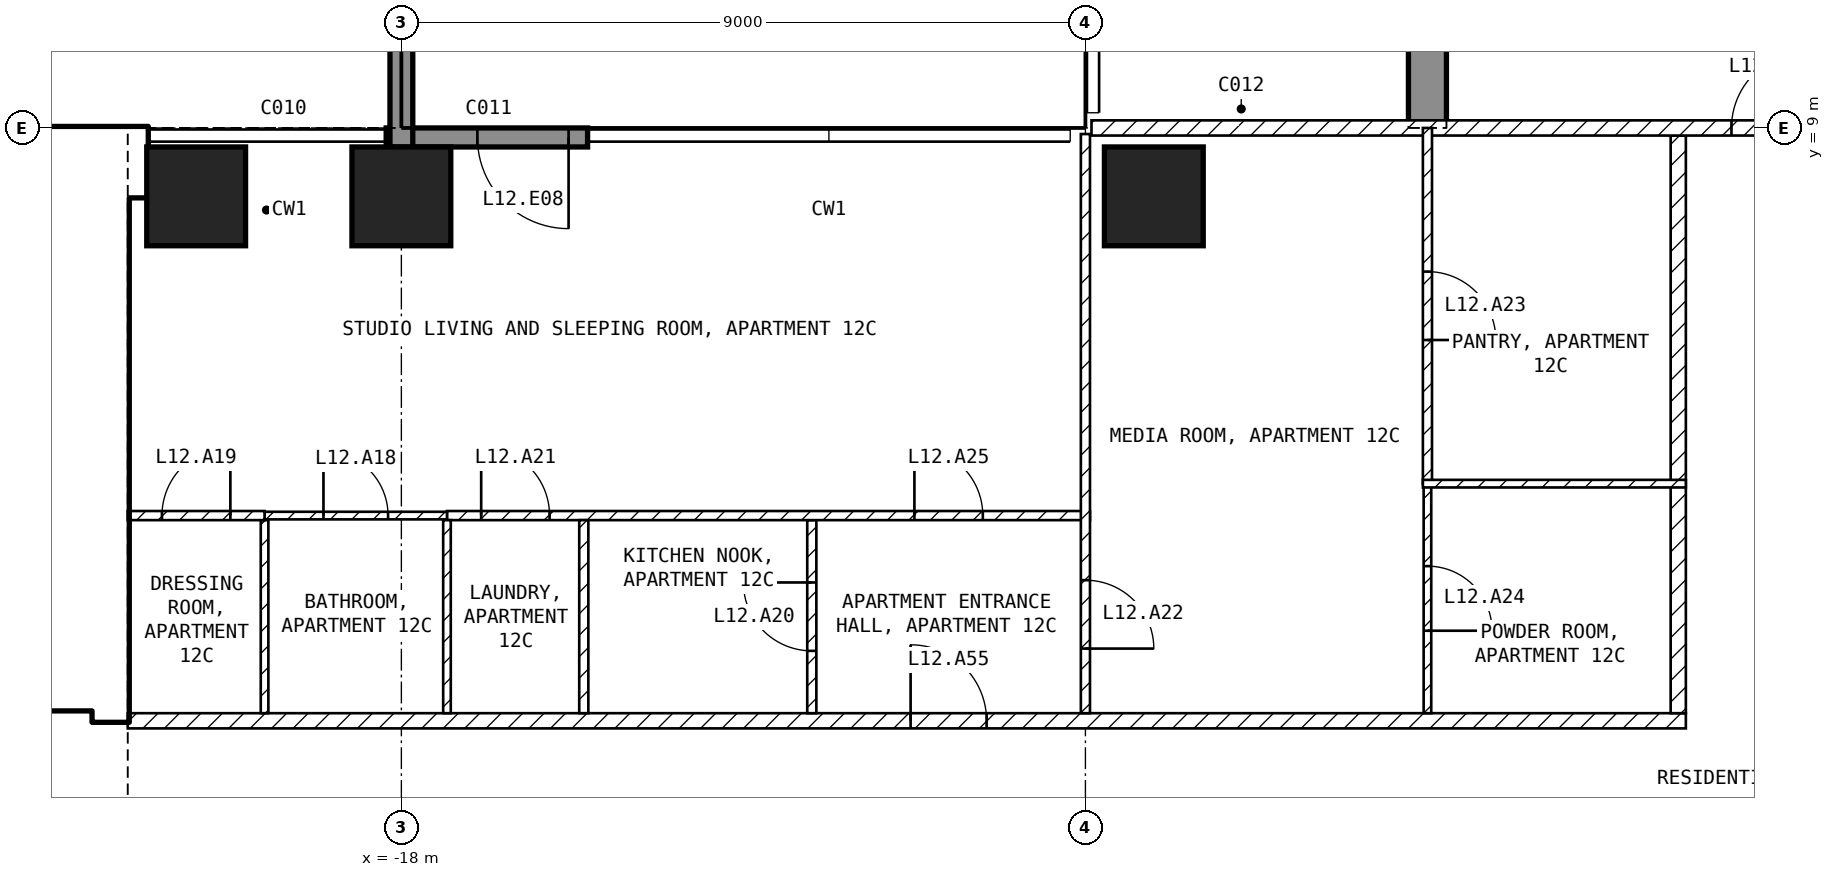
"""IFC4 building model, lengths in metres.
Left out: names, types, materials, properties, quantities, classifications, styles, units other than length and angle.
Written with IfcOpenShell. Run it as: python <this file> out.ifc"""

import sys

from ifc_helpers import new_model, si_unit, direction, frame, frame_2d, origin, origin_2d, place, context, subcontext, project, spatial, polyline, rectangle, outline, extrude, element, fill, save


model = new_model("IFC4")
c1 = context("Model", 3, precision=1e-05, world=origin(), true_north=direction((0.0, 1.0)))
c2 = subcontext(c1, "Body", "Model", "MODEL_VIEW")
j1 = project(units=[si_unit("LENGTHUNIT", "METRE"), si_unit("PLANEANGLEUNIT", "RADIAN")], contexts=[c1])
p1 = place(None, origin())
s1 = spatial("IfcSite", under=j1, at=p1, CompositionType="ELEMENT")
p2 = place(p1, origin())
s2 = spatial("IfcBuilding", under=s1, at=p2, CompositionType="ELEMENT")
p3 = place(p2, frame((0.0, 0.0, 61.0)))
s3 = spatial("IfcBuildingStorey", under=s2, at=p3, CompositionType="ELEMENT", Elevation=61.0)
for number, where, z_axis, x_axis in (
    (1, (-20.7, 8.1, -0.25), (0.0, 0.0, 1.0), (1.0, 0.0, 0.0)),
    (2, (-18.0, 8.1, -0.25), (0.0, 0.0, 1.0), (1.0, 0.0, 0.0)),
    (3, (-8.1, 8.1, -0.25), (0.0, 0.0, 1.0), (1.0, 0.0, 0.0)),
):
    element("IfcColumn", number, at=place(p3, frame(where, z_axis=z_axis, x_axis=x_axis)), inside=s3, PredefinedType="COLUMN", context=c2, shape_type="SweptSolid", body=[
        extrude(rectangle(XDim=1.3, YDim=1.3, at=origin_2d()), origin(), (0.0, 0.0, 1.0), 3.5),
    ])
p4 = place(p3, frame((-4.75, 9.0, -0.25), z_axis=(1.0, 0.0, 0.0), x_axis=(0.0, 1.0, 0.0)))
e4 = element("IfcWall", 4, at=p4, inside=s3, PredefinedType="SHEAR", context=c2, shape_type="SweptSolid", body=[
    extrude(outline(polyline([(0.0, 0.0), (2.1, 0.0), (2.1, 2.65), (4.5, 2.65), (4.5, 0.0), (9.9, 0.0), (9.9, 2.65), (12.3, 2.65), (12.3, 0.0), (16.45, 0.0), (16.45, 3.5), (0.0, 3.5), (0.0, 0.0)])), origin(), (0.0, 0.0, 1.0), 0.5),
])
p5 = place(p3, frame((-15.55, 8.875, 0.0), z_axis=(0.0, 0.0, 1.0), x_axis=(-1.0, 0.0, 0.0)))
e5 = element("IfcWall", 5, at=p5, inside=s3, PredefinedType="SOLIDWALL", context=c2, shape_type="SweptSolid", body=[
    extrude(rectangle(XDim=2.65, YDim=0.25, at=frame_2d((1.325, 0.0))), origin(), (0.0, 0.0, 1.0), 3.25),
])
p6 = place(p5, frame((0.25, 0.0, 0.0)))
e6 = element("IfcOpeningElement", 6, at=p6, cuts=e5, PredefinedType="OPENING", context=c2, shape_type="SweptSolid", body=[
    extrude(rectangle(XDim=1.2, YDim=2.4, at=frame_2d((0.6, 1.2))), frame((0.0, 0.135, 0.0), z_axis=(0.0, -1.0, 0.0), x_axis=(1.0, 0.0, 0.0)), (0.0, 0.0, 1.0), 0.27),
])
p7 = place(p3, frame((-18.0, 8.75, 0.0), z_axis=(0.0, 0.0, 1.0), x_axis=(0.0, 1.0, 0.0)))
e7 = element("IfcWall", 7, at=p7, inside=s3, PredefinedType="SOLIDWALL", context=c2, shape_type="SweptSolid", body=[
    extrude(rectangle(XDim=2.95, YDim=0.3, at=frame_2d((1.475, 0.0))), origin(), (0.0, 0.0, 1.0), 3.25),
])
p8 = place(p3, frame((-31.5, 8.55, 0.0), z_axis=(0.0, 0.0, 1.0), x_axis=(1.0, 0.0, 0.0)))
e8 = element("IfcWall", 8, at=p8, inside=s3, PredefinedType="SHEAR", context=c2, shape_type="SweptSolid", body=[
    extrude(rectangle(XDim=10.15, YDim=0.9, at=frame_2d((5.075, 0.0))), origin(), (0.0, 0.0, 1.0), 3.25),
])
p9 = place(p3, frame((-21.825, 1.2, 0.0), z_axis=(0.0, 0.0, 1.0), x_axis=(0.0, 1.0, 0.0)))
e9 = element("IfcWall", 9, at=p9, inside=s3, PredefinedType="SHEAR", context=c2, shape_type="SweptSolid", body=[
    extrude(rectangle(XDim=6.9, YDim=0.45, at=frame_2d((3.45, 0.0))), origin(), (0.0, 0.0, 1.0), 3.25),
])
p10 = place(p3, frame((-35.1, 1.45, 0.0), z_axis=(0.0, 0.0, 1.0), x_axis=(1.0, 0.0, 0.0)))
e10 = element("IfcWall", 10, at=p10, inside=s3, PredefinedType="SOLIDWALL", context=c2, shape_type="SweptSolid", body=[
    extrude(rectangle(XDim=13.05, YDim=0.2, at=frame_2d((6.525, 0.0))), origin(), (0.0, 0.0, 1.0), 3.25),
])
p11 = place(p10, frame((11.3, 0.0, 0.0)))
e11 = element("IfcOpeningElement", 11, at=p11, cuts=e10, PredefinedType="OPENING", context=c2, shape_type="SweptSolid", body=[
    extrude(rectangle(XDim=1.0, YDim=2.1, at=frame_2d((0.5, 1.05))), frame((0.0, 0.11, 0.0), z_axis=(0.0, -1.0, 0.0), x_axis=(1.0, 0.0, 0.0)), (0.0, 0.0, 1.0), 0.22),
])
p12 = place(p10, frame((8.8, 0.0, 0.0)))
e12 = element("IfcOpeningElement", 12, at=p12, cuts=e10, PredefinedType="OPENING", context=c2, shape_type="SweptSolid", body=[
    extrude(rectangle(XDim=1.0, YDim=2.1, at=frame_2d((0.5, 1.05))), frame((0.0, 0.11, 0.0), z_axis=(0.0, -1.0, 0.0), x_axis=(1.0, 0.0, 0.0)), (0.0, 0.0, 1.0), 0.22),
])
p13 = place(p3, frame((-28.35, 5.15, 0.0), z_axis=(0.0, 0.0, 1.0), x_axis=(1.0, 0.0, 0.0)))
e13 = element("IfcWall", 13, at=p13, inside=s3, PredefinedType="SOLIDWALL", context=c2, shape_type="SweptSolid", body=[
    extrude(rectangle(XDim=6.3, YDim=0.2, at=frame_2d((3.15, 0.0))), origin(), (0.0, 0.0, 1.0), 3.25),
])
p14 = place(p13, frame((5.1, 0.0, 0.0)))
e14 = element("IfcOpeningElement", 14, at=p14, cuts=e13, PredefinedType="OPENING", context=c2, shape_type="SweptSolid", body=[
    extrude(rectangle(XDim=1.0, YDim=2.1, at=frame_2d((0.5, 1.05))), frame((0.0, 0.11, 0.0), z_axis=(0.0, -1.0, 0.0), x_axis=(1.0, 0.0, 0.0)), (0.0, 0.0, 1.0), 0.22),
])
p15 = place(p3, frame((-21.6, 1.2, 0.0), z_axis=(0.0, 0.0, 1.0), x_axis=(1.0, 0.0, 0.0)))
e15 = element("IfcWall", 15, at=p15, inside=s3, PredefinedType="PARTITIONING", context=c2, shape_type="SweptSolid", body=[
    extrude(rectangle(XDim=20.5, YDim=0.2, at=frame_2d((10.25, 0.0))), origin(), (0.0, 0.0, 1.0), 3.25),
])
p16 = place(p15, frame((10.3, 0.0, 0.0)))
e16 = element("IfcOpeningElement", 16, at=p16, cuts=e15, PredefinedType="OPENING", context=c2, shape_type="SweptSolid", body=[
    extrude(rectangle(XDim=1.0, YDim=2.1, at=frame_2d((0.5, 1.05))), frame((0.0, 0.11, 0.0), z_axis=(0.0, -1.0, 0.0), x_axis=(1.0, 0.0, 0.0)), (0.0, 0.0, 1.0), 0.22),
])
p17 = place(p3, frame((-1.2, 1.3, 0.0), z_axis=(0.0, 0.0, 1.0), x_axis=(0.0, 1.0, 0.0)))
e17 = element("IfcWall", 17, at=p17, inside=s3, PredefinedType="PARTITIONING", context=c2, shape_type="SweptSolid", body=[
    extrude(rectangle(XDim=7.6, YDim=0.2, at=frame_2d((3.8, 0.0))), origin(), (0.0, 0.0, 1.0), 3.25),
])
p18 = place(p3, frame((-8.92, 9.0, 0.0), z_axis=(0.0, 0.0, 1.0), x_axis=(1.0, 0.0, 0.0)))
e18 = element("IfcWall", 18, at=p18, inside=s3, PredefinedType="PARTITIONING", context=c2, shape_type="SweptSolid", body=[
    extrude(rectangle(XDim=17.84, YDim=0.2, at=frame_2d((8.92, 0.0))), origin(), (0.0, 0.0, 1.0), 3.25),
])
p19 = place(p18, frame((8.42, 0.0, 0.0)))
e19 = element("IfcOpeningElement", 19, at=p19, cuts=e18, PredefinedType="OPENING", context=c2, shape_type="SweptSolid", body=[
    extrude(rectangle(XDim=1.0, YDim=2.1, at=frame_2d((0.5, 1.05))), frame((0.0, 0.11, 0.0), z_axis=(0.0, -1.0, 0.0), x_axis=(1.0, 0.0, 0.0)), (0.0, 0.0, 1.0), 0.22),
])
p20 = place(p3, frame((-12.6, 1.3, 0.0), z_axis=(0.0, 0.0, 1.0), x_axis=(0.0, 1.0, 0.0)))
e20 = element("IfcWall", 20, at=p20, inside=s3, PredefinedType="PARTITIONING", context=c2, shape_type="SweptSolid", body=[
    extrude(rectangle(XDim=2.54, YDim=0.12, at=frame_2d((1.27, 0.0))), origin(), (0.0, 0.0, 1.0), 3.25),
])
p21 = place(p20, frame((0.82, 0.0, 0.0)))
e21 = element("IfcOpeningElement", 21, at=p21, cuts=e20, PredefinedType="OPENING", context=c2, shape_type="SweptSolid", body=[
    extrude(rectangle(XDim=0.9, YDim=2.1, at=frame_2d((0.45, 1.05))), frame((0.0, 0.07, 0.0), z_axis=(0.0, -1.0, 0.0), x_axis=(1.0, 0.0, 0.0)), (0.0, 0.0, 1.0), 0.14),
])
p22 = place(p3, frame((-17.4, 3.9, 0.0), z_axis=(0.0, 0.0, 1.0), x_axis=(1.0, 0.0, 0.0)))
e22 = element("IfcWall", 22, at=p22, inside=s3, PredefinedType="PARTITIONING", context=c2, shape_type="SweptSolid", body=[
    extrude(rectangle(XDim=8.46, YDim=0.12, at=frame_2d((4.23, 0.0))), origin(), (0.0, 0.0, 1.0), 3.25),
])
p23 = place(p22, frame((0.45, 0.0, 0.0)))
e23 = element("IfcOpeningElement", 23, at=p23, cuts=e22, PredefinedType="OPENING", context=c2, shape_type="SweptSolid", body=[
    extrude(rectangle(XDim=0.9, YDim=2.1, at=frame_2d((0.45, 1.05))), frame((0.0, 0.07, 0.0), z_axis=(0.0, -1.0, 0.0), x_axis=(1.0, 0.0, 0.0)), (0.0, 0.0, 1.0), 0.14),
])
p24 = place(p22, frame((6.15, 0.0, 0.0)))
e24 = element("IfcOpeningElement", 24, at=p24, cuts=e22, PredefinedType="OPENING", context=c2, shape_type="SweptSolid", body=[
    extrude(rectangle(XDim=0.9, YDim=2.1, at=frame_2d((0.45, 1.05))), frame((0.0, 0.07, 0.0), z_axis=(0.0, -1.0, 0.0), x_axis=(1.0, 0.0, 0.0)), (0.0, 0.0, 1.0), 0.14),
])
p25 = place(p3, frame((-9.0, 8.92, 0.0), z_axis=(0.0, 0.0, 1.0), x_axis=(0.0, -1.0, 0.0)))
e25 = element("IfcWall", 25, at=p25, inside=s3, PredefinedType="PARTITIONING", context=c2, shape_type="SweptSolid", body=[
    extrude(rectangle(XDim=7.62, YDim=0.12, at=frame_2d((3.81, 0.0))), origin(), (0.0, 0.0, 1.0), 3.25),
])
p26 = place(p25, frame((5.87, 0.0, 0.0)))
e26 = element("IfcOpeningElement", 26, at=p26, cuts=e25, PredefinedType="OPENING", context=c2, shape_type="SweptSolid", body=[
    extrude(rectangle(XDim=0.9, YDim=2.1, at=frame_2d((0.45, 1.05))), frame((0.0, 0.07, 0.0), z_axis=(0.0, -1.0, 0.0), x_axis=(1.0, 0.0, 0.0)), (0.0, 0.0, 1.0), 0.14),
])
p27 = place(p3, frame((-15.6, 1.3, 0.0), z_axis=(0.0, 0.0, 1.0), x_axis=(0.0, 1.0, 0.0)))
e27 = element("IfcWall", 27, at=p27, inside=s3, PredefinedType="PARTITIONING", context=c2, shape_type="SweptSolid", body=[
    extrude(rectangle(XDim=2.54, YDim=0.12, at=frame_2d((1.27, 0.0))), origin(), (0.0, 0.0, 1.0), 3.25),
])
for number, where, z_axis, x_axis in (
    (28, (-17.4, 1.3, 0.0), (0.0, 0.0, 1.0), (0.0, 1.0, 0.0)),
    (29, (-19.8, 1.3, 0.0), (0.0, 0.0, 1.0), (0.0, 1.0, 0.0)),
):
    element("IfcWall", number, at=place(p3, frame(where, z_axis=z_axis, x_axis=x_axis)), inside=s3, PredefinedType="PARTITIONING", context=c2, shape_type="SweptSolid", body=[
        extrude(rectangle(XDim=2.54, YDim=0.1, at=frame_2d((1.27, 0.0))), origin(), (0.0, 0.0, 1.0), 3.25),
    ])
p28 = place(p3, frame((-19.8, 3.9, 0.0), z_axis=(0.0, 0.0, 1.0), x_axis=(1.0, 0.0, 0.0)))
e30 = element("IfcWall", 30, at=p28, inside=s3, PredefinedType="PARTITIONING", context=c2, shape_type="SweptSolid", body=[
    extrude(rectangle(XDim=2.4, YDim=0.1, at=frame_2d((1.2, 0.0))), origin(), (0.0, 0.0, 1.0), 3.25),
])
p29 = place(p28, frame((0.775, 0.0, 0.0)))
e31 = element("IfcOpeningElement", 31, at=p29, cuts=e30, PredefinedType="OPENING", context=c2, shape_type="SweptSolid", body=[
    extrude(rectangle(XDim=0.85, YDim=2.1, at=frame_2d((0.425, 1.05))), frame((0.0, 0.06, 0.0), z_axis=(0.0, -1.0, 0.0), x_axis=(1.0, 0.0, 0.0)), (0.0, 0.0, 1.0), 0.12),
])
p30 = place(p3, frame((-21.6, 3.9, 0.0), z_axis=(0.0, 0.0, 1.0), x_axis=(1.0, 0.0, 0.0)))
e32 = element("IfcWall", 32, at=p30, inside=s3, PredefinedType="PARTITIONING", context=c2, shape_type="SweptSolid", body=[
    extrude(rectangle(XDim=1.8, YDim=0.12, at=frame_2d((0.9, 0.0))), origin(), (0.0, 0.0, 1.0), 3.25),
])
p31 = place(p30, frame((0.45, 0.0, 0.0)))
e33 = element("IfcOpeningElement", 33, at=p31, cuts=e32, PredefinedType="OPENING", context=c2, shape_type="SweptSolid", body=[
    extrude(rectangle(XDim=0.9, YDim=2.1, at=frame_2d((0.45, 1.05))), frame((0.0, 0.07, 0.0), z_axis=(0.0, -1.0, 0.0), x_axis=(1.0, 0.0, 0.0)), (0.0, 0.0, 1.0), 0.14),
])
p32 = place(p3, frame((-4.5, 4.32, 0.0), z_axis=(0.0, 0.0, 1.0), x_axis=(0.0, -1.0, 0.0)))
e34 = element("IfcWall", 34, at=p32, inside=s3, PredefinedType="PARTITIONING", context=c2, shape_type="SweptSolid", body=[
    extrude(rectangle(XDim=3.02, YDim=0.1, at=frame_2d((1.51, 0.0))), origin(), (0.0, 0.0, 1.0), 3.25),
])
p33 = place(p32, frame((1.085, 0.0, 0.0)))
e35 = element("IfcOpeningElement", 35, at=p33, cuts=e34, PredefinedType="OPENING", context=c2, shape_type="SweptSolid", body=[
    extrude(rectangle(XDim=0.85, YDim=2.1, at=frame_2d((0.425, 1.05))), frame((0.0, 0.06, 0.0), z_axis=(0.0, -1.0, 0.0), x_axis=(1.0, 0.0, 0.0)), (0.0, 0.0, 1.0), 0.12),
])
p34 = place(p3, frame((-4.5, 9.0, 0.0), z_axis=(0.0, 0.0, 1.0), x_axis=(0.0, -1.0, 0.0)))
e36 = element("IfcWall", 36, at=p34, inside=s3, PredefinedType="PARTITIONING", context=c2, shape_type="SweptSolid", body=[
    extrude(rectangle(XDim=4.68, YDim=0.12, at=frame_2d((2.34, 0.0))), origin(), (0.0, 0.0, 1.0), 3.25),
])
p35 = place(p34, frame((1.89, 0.0, 0.0)))
e37 = element("IfcOpeningElement", 37, at=p35, cuts=e36, PredefinedType="OPENING", context=c2, shape_type="SweptSolid", body=[
    extrude(rectangle(XDim=0.9, YDim=2.1, at=frame_2d((0.45, 1.05))), frame((0.0, 0.07, 0.0), z_axis=(0.0, -1.0, 0.0), x_axis=(1.0, 0.0, 0.0)), (0.0, 0.0, 1.0), 0.14),
])
p36 = place(p3, frame((-4.56, 4.32, 0.0), z_axis=(0.0, 0.0, 1.0), x_axis=(1.0, 0.0, 0.0)))
e38 = element("IfcWall", 38, at=p36, inside=s3, PredefinedType="PARTITIONING", context=c2, shape_type="SweptSolid", body=[
    extrude(rectangle(XDim=3.46, YDim=0.1, at=frame_2d((1.73, 0.0))), origin(), (0.0, 0.0, 1.0), 3.25),
])
p37 = place(p6, origin())
e39 = element("IfcDoor", 39, at=p37, inside=s3, OperationType="SINGLE_SWING_LEFT", PredefinedType="DOOR", context=c2, shape_type="SweptSolid", body=[
    extrude(rectangle(XDim=1.2, YDim=2.4, at=frame_2d((0.6, 1.2))), frame((0.0, 0.025, 0.0), z_axis=(0.0, -1.0, 0.0), x_axis=(1.0, 0.0, 0.0)), (0.0, 0.0, 1.0), 0.05),
])
fill(e6, e39)
p38 = place(p14, origin())
e40 = element("IfcDoor", 40, at=p38, inside=s3, OperationType="SINGLE_SWING_LEFT", PredefinedType="DOOR", context=c2, shape_type="SweptSolid", body=[
    extrude(rectangle(XDim=1.0, YDim=2.1, at=frame_2d((0.5, 1.05))), frame((0.0, 0.025, 0.0), z_axis=(0.0, -1.0, 0.0), x_axis=(1.0, 0.0, 0.0)), (0.0, 0.0, 1.0), 0.05),
])
fill(e14, e40)
p39 = place(p29, origin())
e41 = element("IfcDoor", 41, at=p39, inside=s3, OperationType="SINGLE_SWING_LEFT", PredefinedType="DOOR", context=c2, shape_type="SweptSolid", body=[
    extrude(rectangle(XDim=0.85, YDim=2.1, at=frame_2d((0.425, 1.05))), frame((0.0, 0.025, 0.0), z_axis=(0.0, -1.0, 0.0), x_axis=(1.0, 0.0, 0.0)), (0.0, 0.0, 1.0), 0.05),
])
fill(e31, e41)
p40 = place(p31, origin())
e42 = element("IfcDoor", 42, at=p40, inside=s3, OperationType="SINGLE_SWING_RIGHT", PredefinedType="DOOR", context=c2, shape_type="SweptSolid", body=[
    extrude(rectangle(XDim=0.9, YDim=2.1, at=frame_2d((0.45, 1.05))), frame((0.0, 0.025, 0.0), z_axis=(0.0, -1.0, 0.0), x_axis=(1.0, 0.0, 0.0)), (0.0, 0.0, 1.0), 0.05),
])
fill(e33, e42)
p41 = place(p21, origin())
e43 = element("IfcDoor", 43, at=p41, inside=s3, OperationType="SINGLE_SWING_RIGHT", PredefinedType="DOOR", context=c2, shape_type="SweptSolid", body=[
    extrude(rectangle(XDim=0.9, YDim=2.1, at=frame_2d((0.45, 1.05))), frame((0.0, 0.025, 0.0), z_axis=(0.0, -1.0, 0.0), x_axis=(1.0, 0.0, 0.0)), (0.0, 0.0, 1.0), 0.05),
])
fill(e21, e43)
p42 = place(p23, origin())
e44 = element("IfcDoor", 44, at=p42, inside=s3, OperationType="SINGLE_SWING_LEFT", PredefinedType="DOOR", context=c2, shape_type="SweptSolid", body=[
    extrude(rectangle(XDim=0.9, YDim=2.1, at=frame_2d((0.45, 1.05))), frame((0.0, 0.025, 0.0), z_axis=(0.0, -1.0, 0.0), x_axis=(1.0, 0.0, 0.0)), (0.0, 0.0, 1.0), 0.05),
])
fill(e23, e44)
p43 = place(p26, origin())
e45 = element("IfcDoor", 45, at=p43, inside=s3, OperationType="SINGLE_SWING_RIGHT", PredefinedType="DOOR", context=c2, shape_type="SweptSolid", body=[
    extrude(rectangle(XDim=0.9, YDim=2.1, at=frame_2d((0.45, 1.05))), frame((0.0, 0.025, 0.0), z_axis=(0.0, -1.0, 0.0), x_axis=(1.0, 0.0, 0.0)), (0.0, 0.0, 1.0), 0.05),
])
fill(e26, e45)
p44 = place(p35, origin())
e46 = element("IfcDoor", 46, at=p44, inside=s3, OperationType="SINGLE_SWING_RIGHT", PredefinedType="DOOR", context=c2, shape_type="SweptSolid", body=[
    extrude(rectangle(XDim=0.9, YDim=2.1, at=frame_2d((0.45, 1.05))), frame((0.0, 0.025, 0.0), z_axis=(0.0, -1.0, 0.0), x_axis=(1.0, 0.0, 0.0)), (0.0, 0.0, 1.0), 0.05),
])
fill(e37, e46)
p45 = place(p33, origin())
e47 = element("IfcDoor", 47, at=p45, inside=s3, OperationType="SINGLE_SWING_RIGHT", PredefinedType="DOOR", context=c2, shape_type="SweptSolid", body=[
    extrude(rectangle(XDim=0.85, YDim=2.1, at=frame_2d((0.425, 1.05))), frame((0.0, 0.025, 0.0), z_axis=(0.0, -1.0, 0.0), x_axis=(1.0, 0.0, 0.0)), (0.0, 0.0, 1.0), 0.05),
])
fill(e35, e47)
p46 = place(p24, origin())
e48 = element("IfcDoor", 48, at=p46, inside=s3, OperationType="SINGLE_SWING_LEFT", PredefinedType="DOOR", context=c2, shape_type="SweptSolid", body=[
    extrude(rectangle(XDim=0.9, YDim=2.1, at=frame_2d((0.45, 1.05))), frame((0.0, 0.025, 0.0), z_axis=(0.0, -1.0, 0.0), x_axis=(1.0, 0.0, 0.0)), (0.0, 0.0, 1.0), 0.05),
])
fill(e24, e48)
p47 = place(p19, origin())
e49 = element("IfcDoor", 49, at=p47, inside=s3, OperationType="SINGLE_SWING_RIGHT", PredefinedType="DOOR", context=c2, shape_type="SweptSolid", body=[
    extrude(rectangle(XDim=1.0, YDim=2.1, at=frame_2d((0.5, 1.05))), frame((0.0, 0.025, 0.0), z_axis=(0.0, -1.0, 0.0), x_axis=(1.0, 0.0, 0.0)), (0.0, 0.0, 1.0), 0.05),
])
fill(e19, e49)
p48 = place(p16, origin())
e50 = element("IfcDoor", 50, at=p48, inside=s3, OperationType="SINGLE_SWING_LEFT", PredefinedType="DOOR", context=c2, shape_type="SweptSolid", body=[
    extrude(rectangle(XDim=1.0, YDim=2.1, at=frame_2d((0.5, 1.05))), frame((0.0, 0.025, 0.0), z_axis=(0.0, -1.0, 0.0), x_axis=(1.0, 0.0, 0.0)), (0.0, 0.0, 1.0), 0.05),
])
fill(e16, e50)
save(model, sys.argv[1])
